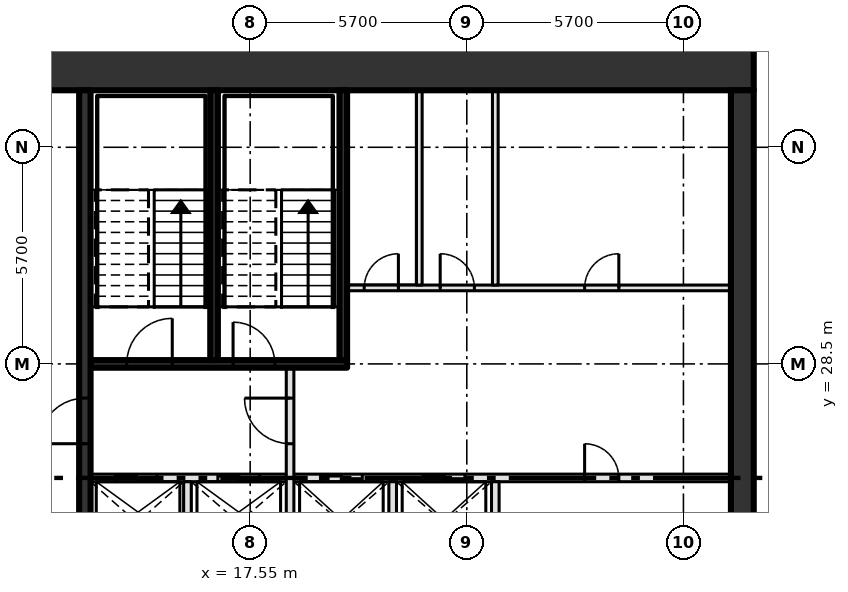
"""IFC4 building model, lengths in metres.
Left out: names, types, materials, properties, quantities, classifications, styles, units other than length and angle.
Written with IfcOpenShell. Run it as: python <this file> out.ifc"""

import sys

from ifc_helpers import new_model, si_unit, direction, frame, frame_2d, origin, place, context, subcontext, project, spatial, rectangle, extrude, element, fill, save


model = new_model("IFC4")
c1 = context("Model", 3, precision=1e-05, world=origin(), true_north=direction((0.0, 1.0)))
c2 = subcontext(c1, "Body", "Model", "MODEL_VIEW")
j1 = project(units=[si_unit("LENGTHUNIT", "METRE"), si_unit("PLANEANGLEUNIT", "RADIAN")], contexts=[c1])
p1 = place(None, origin())
s1 = spatial("IfcSite", under=j1, at=p1, CompositionType="ELEMENT")
p2 = place(p1, origin())
s2 = spatial("IfcBuilding", under=s1, at=p2, CompositionType="ELEMENT")
p3 = place(p2, frame((0.0, 0.0, 315.0)))
s3 = spatial("IfcBuildingStorey", under=s2, at=p3, CompositionType="ELEMENT", Elevation=315.0)
p4 = place(p3, frame((8.0, 36.3, -0.3), z_axis=(0.0, 0.0, 1.0), x_axis=(1.0, 0.0, 0.0)))
e1 = element("IfcWall", 1, at=p4, inside=s3, PredefinedType="SHEAR", context=c2, shape_type="SweptSolid", body=[
    extrude(rectangle(XDim=22.8, YDim=1.2, at=frame_2d((11.4, 0.0))), origin(), (0.0, 0.0, 1.0), 4.2),
])
p5 = place(p4, frame((2.3, 0.0, 0.3)))
e2 = element("IfcOpeningElement", 2, at=p5, cuts=e1, PredefinedType="OPENING", context=c2, shape_type="SweptSolid", body=[
    extrude(rectangle(XDim=1.8, YDim=2.1, at=frame_2d((0.9, 1.05))), frame((0.0, 0.61, 0.0), z_axis=(0.0, -1.0, 0.0), x_axis=(1.0, 0.0, 0.0)), (0.0, 0.0, 1.0), 1.22),
])
p6 = place(p3, frame((30.5, 14.7, -0.3), z_axis=(0.0, 0.0, 1.0), x_axis=(0.0, 1.0, 0.0)))
e3 = element("IfcWall", 3, at=p6, inside=s3, PredefinedType="SHEAR", context=c2, shape_type="SweptSolid", body=[
    extrude(rectangle(XDim=21.0, YDim=0.6, at=frame_2d((10.5, 0.0))), origin(), (0.0, 0.0, 1.0), 4.2),
])
p7 = place(p3, frame((13.35, 25.5, 0.0), z_axis=(0.0, 0.0, 1.0), x_axis=(1.0, 0.0, 0.0)))
e4 = element("IfcWall", 4, at=p7, inside=s3, PredefinedType="SOLIDWALL", context=c2, shape_type="SweptSolid", body=[
    extrude(rectangle(XDim=16.85, YDim=0.2, at=frame_2d((8.425, 0.0))), origin(), (0.0, 0.0, 1.0), 3.9),
])
p8 = place(p7, frame((0.65, 0.0, 0.0)))
e5 = element("IfcOpeningElement", 5, at=p8, cuts=e4, PredefinedType="OPENING", context=c2, shape_type="SweptSolid", body=[
    extrude(rectangle(XDim=1.1, YDim=2.1, at=frame_2d((0.55, 1.05))), frame((0.0, 0.11, 0.0), z_axis=(0.0, -1.0, 0.0), x_axis=(1.0, 0.0, 0.0)), (0.0, 0.0, 1.0), 0.22),
])
p9 = place(p7, frame((3.35, 0.0, 0.0)))
e6 = element("IfcOpeningElement", 6, at=p9, cuts=e4, PredefinedType="OPENING", context=c2, shape_type="SweptSolid", body=[
    extrude(rectangle(XDim=1.1, YDim=2.1, at=frame_2d((0.55, 1.05))), frame((0.0, 0.11, 0.0), z_axis=(0.0, -1.0, 0.0), x_axis=(1.0, 0.0, 0.0)), (0.0, 0.0, 1.0), 0.22),
])
p10 = place(p7, frame((6.05, 0.0, 0.0)))
e7 = element("IfcOpeningElement", 7, at=p10, cuts=e4, PredefinedType="OPENING", context=c2, shape_type="SweptSolid", body=[
    extrude(rectangle(XDim=1.1, YDim=2.1, at=frame_2d((0.55, 1.05))), frame((0.0, 0.11, 0.0), z_axis=(0.0, -1.0, 0.0), x_axis=(1.0, 0.0, 0.0)), (0.0, 0.0, 1.0), 0.22),
])
p11 = place(p7, frame((8.75, 0.0, 0.0)))
e8 = element("IfcOpeningElement", 8, at=p11, cuts=e4, PredefinedType="OPENING", context=c2, shape_type="SweptSolid", body=[
    extrude(rectangle(XDim=1.1, YDim=2.1, at=frame_2d((0.55, 1.05))), frame((0.0, 0.11, 0.0), z_axis=(0.0, -1.0, 0.0), x_axis=(1.0, 0.0, 0.0)), (0.0, 0.0, 1.0), 0.22),
])
p12 = place(p7, frame((13.0, 0.0, 0.0)))
e9 = element("IfcOpeningElement", 9, at=p12, cuts=e4, PredefinedType="OPENING", context=c2, shape_type="SweptSolid", body=[
    extrude(rectangle(XDim=0.9, YDim=2.1, at=frame_2d((0.45, 1.05))), frame((0.0, 0.11, 0.0), z_axis=(0.0, -1.0, 0.0), x_axis=(1.0, 0.0, 0.0)), (0.0, 0.0, 1.0), 0.22),
])
p13 = place(p3, frame((13.35, 28.5, 0.0), z_axis=(0.0, 0.0, 1.0), x_axis=(1.0, 0.0, 0.0)))
e10 = element("IfcWall", 10, at=p13, inside=s3, PredefinedType="SOLIDWALL", context=c2, shape_type="SweptSolid", body=[
    extrude(rectangle(XDim=6.75, YDim=0.2, at=frame_2d((3.375, 0.0))), origin(), (0.0, 0.0, 1.0), 3.9),
])
p14 = place(p13, frame((0.95, 0.0, 0.0)))
e11 = element("IfcOpeningElement", 11, at=p14, cuts=e10, PredefinedType="OPENING", context=c2, shape_type="SweptSolid", body=[
    extrude(rectangle(XDim=1.2, YDim=2.1, at=frame_2d((0.6, 1.05))), frame((0.0, 0.11, 0.0), z_axis=(0.0, -1.0, 0.0), x_axis=(1.0, 0.0, 0.0)), (0.0, 0.0, 1.0), 0.22),
])
p15 = place(p13, frame((3.75, 0.0, 0.0)))
e12 = element("IfcOpeningElement", 12, at=p15, cuts=e10, PredefinedType="OPENING", context=c2, shape_type="SweptSolid", body=[
    extrude(rectangle(XDim=1.1, YDim=2.1, at=frame_2d((0.55, 1.05))), frame((0.0, 0.11, 0.0), z_axis=(0.0, -1.0, 0.0), x_axis=(1.0, 0.0, 0.0)), (0.0, 0.0, 1.0), 0.22),
])
p16 = place(p3, frame((20.1, 30.5, 0.0), z_axis=(0.0, 0.0, 1.0), x_axis=(1.0, 0.0, 0.0)))
e13 = element("IfcWall", 13, at=p16, inside=s3, PredefinedType="PARTITIONING", context=c2, shape_type="SweptSolid", body=[
    extrude(rectangle(XDim=10.1, YDim=0.15, at=frame_2d((5.05, 0.0))), origin(), (0.0, 0.0, 1.0), 3.9),
])
p17 = place(p16, frame((0.45, 0.0, 0.0)))
e14 = element("IfcOpeningElement", 14, at=p17, cuts=e13, PredefinedType="OPENING", context=c2, shape_type="SweptSolid", body=[
    extrude(rectangle(XDim=0.9, YDim=2.1, at=frame_2d((0.45, 1.05))), frame((0.0, 0.085, 0.0), z_axis=(0.0, -1.0, 0.0), x_axis=(1.0, 0.0, 0.0)), (0.0, 0.0, 1.0), 0.17),
])
p18 = place(p16, frame((2.45, 0.0, 0.0)))
e15 = element("IfcOpeningElement", 15, at=p18, cuts=e13, PredefinedType="OPENING", context=c2, shape_type="SweptSolid", body=[
    extrude(rectangle(XDim=0.9, YDim=2.1, at=frame_2d((0.45, 1.05))), frame((0.0, 0.085, 0.0), z_axis=(0.0, -1.0, 0.0), x_axis=(1.0, 0.0, 0.0)), (0.0, 0.0, 1.0), 0.17),
])
p19 = place(p16, frame((6.25, 0.0, 0.0)))
e16 = element("IfcOpeningElement", 16, at=p19, cuts=e13, PredefinedType="OPENING", context=c2, shape_type="SweptSolid", body=[
    extrude(rectangle(XDim=0.9, YDim=2.1, at=frame_2d((0.45, 1.05))), frame((0.0, 0.085, 0.0), z_axis=(0.0, -1.0, 0.0), x_axis=(1.0, 0.0, 0.0)), (0.0, 0.0, 1.0), 0.17),
])
p20 = place(p3, frame((13.2, 14.7, 0.0), z_axis=(0.0, 0.0, 1.0), x_axis=(0.0, 1.0, 0.0)))
e17 = element("IfcWall", 17, at=p20, inside=s3, PredefinedType="SHEAR", context=c2, shape_type="SweptSolid", body=[
    extrude(rectangle(XDim=21.0, YDim=0.3, at=frame_2d((10.5, 0.0))), origin(), (0.0, 0.0, 1.0), 3.9),
])
p21 = place(p20, frame((3.6, 0.0, 0.0)))
e18 = element("IfcOpeningElement", 18, at=p21, cuts=e17, PredefinedType="OPENING", context=c2, shape_type="SweptSolid", body=[
    extrude(rectangle(XDim=1.8, YDim=2.1, at=frame_2d((0.9, 1.05))), frame((0.0, 0.16, 0.0), z_axis=(0.0, -1.0, 0.0), x_axis=(1.0, 0.0, 0.0)), (0.0, 0.0, 1.0), 0.32),
])
p22 = place(p20, frame((11.7, 0.0, 0.0)))
e19 = element("IfcOpeningElement", 19, at=p22, cuts=e17, PredefinedType="OPENING", context=c2, shape_type="SweptSolid", body=[
    extrude(rectangle(XDim=1.2, YDim=2.1, at=frame_2d((0.6, 1.05))), frame((0.0, 0.16, 0.0), z_axis=(0.0, -1.0, 0.0), x_axis=(1.0, 0.0, 0.0)), (0.0, 0.0, 1.0), 0.32),
])
p23 = place(p3, frame((15.9, 23.25, 0.0), z_axis=(0.0, 0.0, 1.0), x_axis=(0.0, 1.0, 0.0)))
e20 = element("IfcWall", 20, at=p23, inside=s3, PredefinedType="SOLIDWALL", context=c2, shape_type="SweptSolid", body=[
    extrude(rectangle(XDim=2.15, YDim=0.2, at=frame_2d((1.075, 0.0))), origin(), (0.0, 0.0, 1.0), 3.9),
])
p24 = place(p3, frame((16.6, 28.6, 0.0), z_axis=(0.0, 0.0, 1.0), x_axis=(0.0, 1.0, 0.0)))
e21 = element("IfcWall", 21, at=p24, inside=s3, PredefinedType="SOLIDWALL", context=c2, shape_type="SweptSolid", body=[
    extrude(rectangle(XDim=7.1, YDim=0.2, at=frame_2d((3.55, 0.0))), origin(), (0.0, 0.0, 1.0), 3.9),
])
p25 = place(p3, frame((18.6, 23.25, 0.0), z_axis=(0.0, 0.0, 1.0), x_axis=(0.0, 1.0, 0.0)))
e22 = element("IfcWall", 22, at=p25, inside=s3, PredefinedType="SOLIDWALL", context=c2, shape_type="SweptSolid", body=[
    extrude(rectangle(XDim=5.15, YDim=0.2, at=frame_2d((2.575, 0.0))), origin(), (0.0, 0.0, 1.0), 3.9),
])
p26 = place(p25, frame((3.15, 0.0, 0.0)))
e23 = element("IfcOpeningElement", 23, at=p26, cuts=e22, PredefinedType="OPENING", context=c2, shape_type="SweptSolid", body=[
    extrude(rectangle(XDim=1.2, YDim=2.1, at=frame_2d((0.6, 1.05))), frame((0.0, 0.11, 0.0), z_axis=(0.0, -1.0, 0.0), x_axis=(1.0, 0.0, 0.0)), (0.0, 0.0, 1.0), 0.22),
])
p27 = place(p3, frame((20.0, 28.6, 0.0), z_axis=(0.0, 0.0, 1.0), x_axis=(0.0, 1.0, 0.0)))
e24 = element("IfcWall", 24, at=p27, inside=s3, PredefinedType="SOLIDWALL", context=c2, shape_type="SweptSolid", body=[
    extrude(rectangle(XDim=7.1, YDim=0.2, at=frame_2d((3.55, 0.0))), origin(), (0.0, 0.0, 1.0), 3.9),
])
p28 = place(p3, frame((21.3, 20.775, 0.0), z_axis=(0.0, 0.0, 1.0), x_axis=(0.0, 1.0, 0.0)))
e25 = element("IfcWall", 25, at=p28, inside=s3, PredefinedType="SOLIDWALL", context=c2, shape_type="SweptSolid", body=[
    extrude(rectangle(XDim=4.625, YDim=0.2, at=frame_2d((2.312, 0.0))), origin(), (0.0, 0.0, 1.0), 3.9),
])
p29 = place(p3, frame((22.0, 30.575, 0.0), z_axis=(0.0, 0.0, 1.0), x_axis=(0.0, 1.0, 0.0)))
e26 = element("IfcWall", 26, at=p29, inside=s3, PredefinedType="PARTITIONING", context=c2, shape_type="SweptSolid", body=[
    extrude(rectangle(XDim=5.125, YDim=0.15, at=frame_2d((2.562, 0.0))), origin(), (0.0, 0.0, 1.0), 3.9),
])
p30 = place(p3, frame((24.0, 23.25, 0.0), z_axis=(0.0, 0.0, 1.0), x_axis=(0.0, 1.0, 0.0)))
e27 = element("IfcWall", 27, at=p30, inside=s3, PredefinedType="SOLIDWALL", context=c2, shape_type="SweptSolid", body=[
    extrude(rectangle(XDim=2.15, YDim=0.2, at=frame_2d((1.075, 0.0))), origin(), (0.0, 0.0, 1.0), 3.9),
])
p31 = place(p3, frame((24.0, 30.575, 0.0), z_axis=(0.0, 0.0, 1.0), x_axis=(0.0, 1.0, 0.0)))
e28 = element("IfcWall", 28, at=p31, inside=s3, PredefinedType="PARTITIONING", context=c2, shape_type="SweptSolid", body=[
    extrude(rectangle(XDim=5.125, YDim=0.15, at=frame_2d((2.562, 0.0))), origin(), (0.0, 0.0, 1.0), 3.9),
])
p32 = place(p8, origin())
e29 = element("IfcDoor", 29, at=p32, inside=s3, OperationType="SLIDING_TO_LEFT", PredefinedType="DOOR", context=c2, shape_type="SweptSolid", body=[
    extrude(rectangle(XDim=1.1, YDim=2.1, at=frame_2d((0.55, 1.05))), frame((0.0, 0.025, 0.0), z_axis=(0.0, -1.0, 0.0), x_axis=(1.0, 0.0, 0.0)), (0.0, 0.0, 1.0), 0.05),
])
fill(e5, e29)
p33 = place(p9, origin())
e30 = element("IfcDoor", 30, at=p33, inside=s3, OperationType="SLIDING_TO_LEFT", PredefinedType="DOOR", context=c2, shape_type="SweptSolid", body=[
    extrude(rectangle(XDim=1.1, YDim=2.1, at=frame_2d((0.55, 1.05))), frame((0.0, 0.025, 0.0), z_axis=(0.0, -1.0, 0.0), x_axis=(1.0, 0.0, 0.0)), (0.0, 0.0, 1.0), 0.05),
])
fill(e6, e30)
p34 = place(p10, origin())
e31 = element("IfcDoor", 31, at=p34, inside=s3, OperationType="SLIDING_TO_LEFT", PredefinedType="DOOR", context=c2, shape_type="SweptSolid", body=[
    extrude(rectangle(XDim=1.1, YDim=2.1, at=frame_2d((0.55, 1.05))), frame((0.0, 0.025, 0.0), z_axis=(0.0, -1.0, 0.0), x_axis=(1.0, 0.0, 0.0)), (0.0, 0.0, 1.0), 0.05),
])
fill(e7, e31)
p35 = place(p11, origin())
e32 = element("IfcDoor", 32, at=p35, inside=s3, OperationType="SLIDING_TO_LEFT", PredefinedType="DOOR", context=c2, shape_type="SweptSolid", body=[
    extrude(rectangle(XDim=1.1, YDim=2.1, at=frame_2d((0.55, 1.05))), frame((0.0, 0.025, 0.0), z_axis=(0.0, -1.0, 0.0), x_axis=(1.0, 0.0, 0.0)), (0.0, 0.0, 1.0), 0.05),
])
fill(e8, e32)
p36 = place(p12, origin())
e33 = element("IfcDoor", 33, at=p36, inside=s3, OperationType="SINGLE_SWING_LEFT", PredefinedType="DOOR", context=c2, shape_type="SweptSolid", body=[
    extrude(rectangle(XDim=0.9, YDim=2.1, at=frame_2d((0.45, 1.05))), frame((0.0, 0.025, 0.0), z_axis=(0.0, -1.0, 0.0), x_axis=(1.0, 0.0, 0.0)), (0.0, 0.0, 1.0), 0.05),
])
fill(e9, e33)
p37 = place(p17, origin())
e34 = element("IfcDoor", 34, at=p37, inside=s3, OperationType="SINGLE_SWING_RIGHT", PredefinedType="DOOR", context=c2, shape_type="SweptSolid", body=[
    extrude(rectangle(XDim=0.9, YDim=2.1, at=frame_2d((0.45, 1.05))), frame((0.0, 0.025, 0.0), z_axis=(0.0, -1.0, 0.0), x_axis=(1.0, 0.0, 0.0)), (0.0, 0.0, 1.0), 0.05),
])
fill(e14, e34)
p38 = place(p18, origin())
e35 = element("IfcDoor", 35, at=p38, inside=s3, OperationType="SINGLE_SWING_LEFT", PredefinedType="DOOR", context=c2, shape_type="SweptSolid", body=[
    extrude(rectangle(XDim=0.9, YDim=2.1, at=frame_2d((0.45, 1.05))), frame((0.0, 0.025, 0.0), z_axis=(0.0, -1.0, 0.0), x_axis=(1.0, 0.0, 0.0)), (0.0, 0.0, 1.0), 0.05),
])
fill(e15, e35)
p39 = place(p19, origin())
e36 = element("IfcDoor", 36, at=p39, inside=s3, OperationType="SINGLE_SWING_RIGHT", PredefinedType="DOOR", context=c2, shape_type="SweptSolid", body=[
    extrude(rectangle(XDim=0.9, YDim=2.1, at=frame_2d((0.45, 1.05))), frame((0.0, 0.025, 0.0), z_axis=(0.0, -1.0, 0.0), x_axis=(1.0, 0.0, 0.0)), (0.0, 0.0, 1.0), 0.05),
])
fill(e16, e36)
p40 = place(p14, origin())
e37 = element("IfcDoor", 37, at=p40, inside=s3, OperationType="SINGLE_SWING_RIGHT", PredefinedType="DOOR", context=c2, shape_type="SweptSolid", body=[
    extrude(rectangle(XDim=1.2, YDim=2.1, at=frame_2d((0.6, 1.05))), frame((0.0, 0.025, 0.0), z_axis=(0.0, -1.0, 0.0), x_axis=(1.0, 0.0, 0.0)), (0.0, 0.0, 1.0), 0.05),
])
fill(e11, e37)
p41 = place(p15, origin())
e38 = element("IfcDoor", 38, at=p41, inside=s3, OperationType="SINGLE_SWING_LEFT", PredefinedType="DOOR", context=c2, shape_type="SweptSolid", body=[
    extrude(rectangle(XDim=1.1, YDim=2.1, at=frame_2d((0.55, 1.05))), frame((0.0, 0.025, 0.0), z_axis=(0.0, -1.0, 0.0), x_axis=(1.0, 0.0, 0.0)), (0.0, 0.0, 1.0), 0.05),
])
fill(e12, e38)
p42 = place(p22, origin())
e39 = element("IfcDoor", 39, at=p42, inside=s3, OperationType="SINGLE_SWING_LEFT", PredefinedType="DOOR", context=c2, shape_type="SweptSolid", body=[
    extrude(rectangle(XDim=1.2, YDim=2.1, at=frame_2d((0.6, 1.05))), frame((0.0, 0.025, 0.0), z_axis=(0.0, -1.0, 0.0), x_axis=(1.0, 0.0, 0.0)), (0.0, 0.0, 1.0), 0.05),
])
fill(e19, e39)
p43 = place(p26, origin())
e40 = element("IfcDoor", 40, at=p43, inside=s3, OperationType="SINGLE_SWING_RIGHT", PredefinedType="DOOR", context=c2, shape_type="SweptSolid", body=[
    extrude(rectangle(XDim=1.2, YDim=2.1, at=frame_2d((0.6, 1.05))), frame((0.0, 0.025, 0.0), z_axis=(0.0, -1.0, 0.0), x_axis=(1.0, 0.0, 0.0)), (0.0, 0.0, 1.0), 0.05),
])
fill(e23, e40)
save(model, sys.argv[1])
